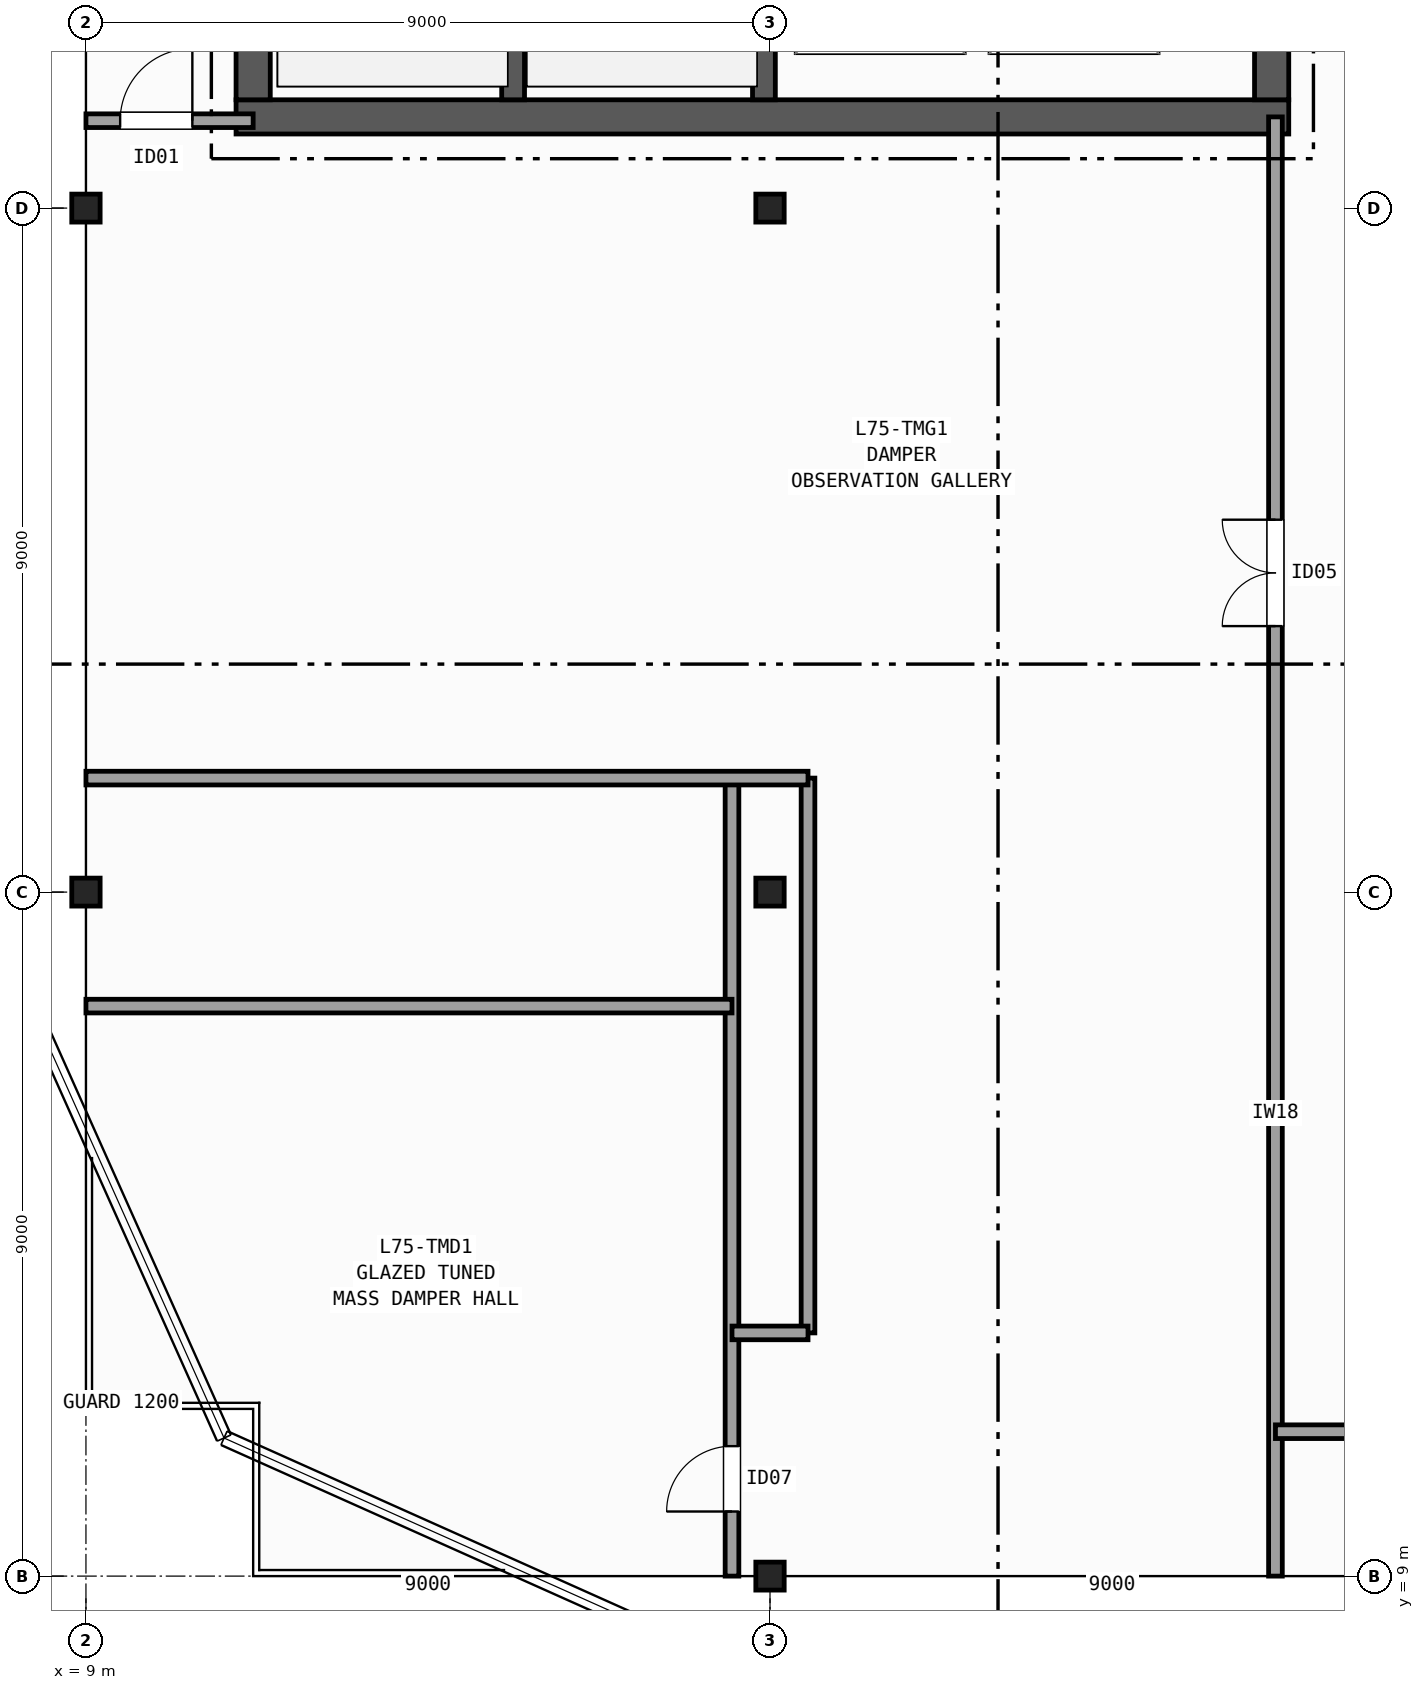
"""IFC4 building model, lengths in metres.
Left out: names, types, materials, properties, quantities, classifications, styles, units other than length and angle.
Written with IfcOpenShell. Run it as: python <this file> out.ifc"""

import sys

from ifc_helpers import new_model, si_unit, direction, frame, frame_2d, origin, origin_2d, place, context, subcontext, project, spatial, rectangle, i_section, extrude, element, fill, save


model = new_model("IFC4")
c1 = context("Model", 3, precision=1e-05, world=origin(), true_north=direction((0.0, 1.0)))
c2 = subcontext(c1, "Body", "Model", "MODEL_VIEW")
j1 = project(units=[si_unit("LENGTHUNIT", "METRE"), si_unit("PLANEANGLEUNIT", "RADIAN")], contexts=[c1])
p1 = place(None, origin())
s1 = spatial("IfcSite", under=j1, at=p1, CompositionType="ELEMENT")
p2 = place(p1, origin())
s2 = spatial("IfcBuilding", under=s1, at=p2, CompositionType="ELEMENT")
p3 = place(p2, frame((0.0, 0.0, 297.4)))
s3 = spatial("IfcBuildingStorey", under=s2, at=p3, CompositionType="ELEMENT", Elevation=297.4)
for number, where, z_axis, x_axis in (
    (1, (9.0, 18.0, 0.0), (0.0, 0.0, 1.0), (1.0, 0.0, 0.0)),
    (2, (9.0, 27.0, 0.0), (0.0, 0.0, 1.0), (1.0, 0.0, 0.0)),
    (3, (18.0, 9.0, 0.0), (0.0, 0.0, 1.0), (1.0, 0.0, 0.0)),
    (4, (18.0, 18.0, 0.0), (0.0, 0.0, 1.0), (1.0, 0.0, 0.0)),
    (5, (18.0, 27.0, 0.0), (0.0, 0.0, 1.0), (1.0, 0.0, 0.0)),
):
    element("IfcColumn", number, at=place(p3, frame(where, z_axis=z_axis, x_axis=x_axis)), inside=s3, PredefinedType="COLUMN", context=c2, shape_type="SweptSolid", body=[
        extrude(i_section(OverallWidth=0.373, OverallDepth=0.368, WebThickness=0.015, FlangeThickness=0.024, FilletRadius=0.015, at=origin_2d()), origin(), (0.0, 0.0, 1.0), 5.2),
    ])
p4 = place(p3, frame((10.975, 28.2, 0.0), z_axis=(0.0, 0.0, 1.0), x_axis=(1.0, 0.0, 0.0)))
e6 = element("IfcWall", 6, at=p4, inside=s3, PredefinedType="SHEAR", context=c2, shape_type="SweptSolid", body=[
    extrude(rectangle(XDim=13.85, YDim=0.45, at=frame_2d((6.925, 0.0))), origin(), (0.0, 0.0, 1.0), 4.87),
])
p5 = place(p3, frame((11.2, 42.175, 0.0), z_axis=(0.0, 0.0, 1.0), x_axis=(0.0, -1.0, 0.0)))
e7 = element("IfcWall", 7, at=p5, inside=s3, PredefinedType="SHEAR", context=c2, shape_type="SweptSolid", body=[
    extrude(rectangle(XDim=13.75, YDim=0.45, at=frame_2d((6.875, 0.0))), origin(), (0.0, 0.0, 1.0), 4.87),
])
p6 = place(p3, frame((24.6, 28.425, 0.0), z_axis=(0.0, 0.0, 1.0), x_axis=(0.0, 1.0, 0.0)))
e8 = element("IfcWall", 8, at=p6, inside=s3, PredefinedType="SHEAR", context=c2, shape_type="SweptSolid", body=[
    extrude(rectangle(XDim=13.75, YDim=0.45, at=frame_2d((6.875, 0.0))), origin(), (0.0, 0.0, 1.0), 4.87),
])
p7 = place(p6, frame((3.375, 0.0, 0.0)))
e9 = element("IfcOpeningElement", 9, at=p7, cuts=e8, PredefinedType="OPENING", context=c2, shape_type="SweptSolid", body=[
    extrude(rectangle(XDim=1.5, YDim=2.2, at=frame_2d((0.75, 1.1))), frame((0.0, 0.235, 0.0), z_axis=(0.0, -1.0, 0.0), x_axis=(1.0, 0.0, 0.0)), (0.0, 0.0, 1.0), 0.47),
])
p8 = place(p6, frame((9.975, 0.0, 0.0)))
e10 = element("IfcOpeningElement", 10, at=p8, cuts=e8, PredefinedType="OPENING", context=c2, shape_type="SweptSolid", body=[
    extrude(rectangle(XDim=0.9, YDim=2.1, at=frame_2d((0.45, 1.05))), frame((0.0, 0.235, 0.0), z_axis=(0.0, -1.0, 0.0), x_axis=(1.0, 0.0, 0.0)), (0.0, 0.0, 1.0), 0.47),
])
p9 = place(p6, frame((12.075, 0.0, 0.0)))
e11 = element("IfcOpeningElement", 11, at=p9, cuts=e8, PredefinedType="OPENING", context=c2, shape_type="SweptSolid", body=[
    extrude(rectangle(XDim=0.9, YDim=2.1, at=frame_2d((0.45, 1.05))), frame((0.0, 0.235, 0.0), z_axis=(0.0, -1.0, 0.0), x_axis=(1.0, 0.0, 0.0)), (0.0, 0.0, 1.0), 0.47),
])
p10 = place(p3, frame((14.62, 28.425, 0.0), z_axis=(0.0, 0.0, 1.0), x_axis=(0.0, 1.0, 0.0)))
e12 = element("IfcWall", 12, at=p10, inside=s3, PredefinedType="SHEAR", context=c2, shape_type="SweptSolid", body=[
    extrude(rectangle(XDim=9.025, YDim=0.3, at=frame_2d((4.512, 0.0))), origin(), (0.0, 0.0, 1.0), 4.87),
])
p11 = place(p3, frame((17.92, 42.175, 0.0), z_axis=(0.0, 0.0, 1.0), x_axis=(0.0, -1.0, 0.0)))
e13 = element("IfcWall", 13, at=p11, inside=s3, PredefinedType="SHEAR", context=c2, shape_type="SweptSolid", body=[
    extrude(rectangle(XDim=13.75, YDim=0.3, at=frame_2d((6.875, 0.0))), origin(), (0.0, 0.0, 1.0), 4.87),
])
p12 = place(p11, frame((2.0, 0.0, 0.0)))
e14 = element("IfcOpeningElement", 14, at=p12, cuts=e13, PredefinedType="OPENING", context=c2, shape_type="SweptSolid", body=[
    extrude(rectangle(XDim=1.15, YDim=2.15, at=frame_2d((0.575, 1.075))), frame((0.0, 0.16, 0.0), z_axis=(0.0, -1.0, 0.0), x_axis=(1.0, 0.0, 0.0)), (0.0, 0.0, 1.0), 0.32),
])
p13 = place(p3, frame((24.65, 9.0, 0.0), z_axis=(0.0, 0.0, 1.0), x_axis=(0.0, 1.0, 0.0)))
e15 = element("IfcWall", 15, at=p13, inside=s3, PredefinedType="PARTITIONING", context=c2, shape_type="SweptSolid", body=[
    extrude(rectangle(XDim=19.2, YDim=0.18, at=frame_2d((9.6, 0.0))), origin(), (0.0, 0.0, 1.0), 4.157),
])
p14 = place(p13, frame((12.5, 0.0, 0.0)))
e16 = element("IfcOpeningElement", 16, at=p14, cuts=e15, PredefinedType="OPENING", context=c2, shape_type="SweptSolid", body=[
    extrude(rectangle(XDim=1.4, YDim=2.15, at=frame_2d((0.7, 1.075))), frame((0.0, 0.1, 0.0), z_axis=(0.0, -1.0, 0.0), x_axis=(1.0, 0.0, 0.0)), (0.0, 0.0, 1.0), 0.2),
])
p15 = place(p3, frame((17.5, 9.0, 0.0), z_axis=(0.0, 0.0, 1.0), x_axis=(0.0, 1.0, 0.0)))
e17 = element("IfcWall", 17, at=p15, inside=s3, PredefinedType="PARTITIONING", context=c2, shape_type="SweptSolid", body=[
    extrude(rectangle(XDim=10.5, YDim=0.18, at=frame_2d((5.25, 0.0))), origin(), (0.0, 0.0, 1.0), 4.239),
])
p16 = place(p15, frame((0.85, 0.0, 0.0)))
e18 = element("IfcOpeningElement", 18, at=p16, cuts=e17, PredefinedType="OPENING", context=c2, shape_type="SweptSolid", body=[
    extrude(rectangle(XDim=0.86, YDim=2.05, at=frame_2d((0.43, 1.025))), frame((0.0, 0.1, 0.0), z_axis=(0.0, -1.0, 0.0), x_axis=(1.0, 0.0, 0.0)), (0.0, 0.0, 1.0), 0.2),
])
p17 = place(p3, frame((18.5, 12.2, 0.0), z_axis=(0.0, 0.0, 1.0), x_axis=(0.0, 1.0, 0.0)))
e19 = element("IfcWall", 19, at=p17, inside=s3, PredefinedType="PARTITIONING", context=c2, shape_type="SweptSolid", body=[
    extrude(rectangle(XDim=7.3, YDim=0.18, at=frame_2d((3.65, 0.0))), origin(), (0.0, 0.0, 1.0), 4.239),
])
p18 = place(p3, frame((17.5, 12.2, 0.0), z_axis=(0.0, 0.0, 1.0), x_axis=(1.0, 0.0, 0.0)))
e20 = element("IfcWall", 20, at=p18, inside=s3, PredefinedType="PARTITIONING", context=c2, shape_type="SweptSolid", body=[
    extrude(rectangle(XDim=1.0, YDim=0.18, at=frame_2d((0.5, 0.0))), origin(), (0.0, 0.0, 1.0), 4.242),
])
p19 = place(p3, frame((9.0, 16.5, 0.0), z_axis=(0.0, 0.0, 1.0), x_axis=(1.0, 0.0, 0.0)))
e21 = element("IfcWall", 21, at=p19, inside=s3, PredefinedType="PARTITIONING", context=c2, shape_type="SweptSolid", body=[
    extrude(rectangle(XDim=8.5, YDim=0.18, at=frame_2d((4.25, 0.0))), origin(), (0.0, 0.0, 1.0), 4.87),
])
p20 = place(p3, frame((9.0, 19.5, 0.0), z_axis=(0.0, 0.0, 1.0), x_axis=(1.0, 0.0, 0.0)))
e22 = element("IfcWall", 22, at=p20, inside=s3, PredefinedType="PARTITIONING", context=c2, shape_type="SweptSolid", body=[
    extrude(rectangle(XDim=9.5, YDim=0.18, at=frame_2d((4.75, 0.0))), origin(), (0.0, 0.0, 1.0), 4.157),
])
p21 = place(p3, frame((9.0, 28.15, 0.0), z_axis=(0.0, 0.0, 1.0), x_axis=(1.0, 0.0, 0.0)))
e23 = element("IfcWall", 23, at=p21, inside=s3, PredefinedType="PARTITIONING", context=c2, shape_type="SweptSolid", body=[
    extrude(rectangle(XDim=2.2, YDim=0.18, at=frame_2d((1.1, 0.0))), origin(), (0.0, 0.0, 1.0), 4.157),
])
p22 = place(p21, frame((0.45, 0.0, 0.0)))
e24 = element("IfcOpeningElement", 24, at=p22, cuts=e23, PredefinedType="OPENING", context=c2, shape_type="SweptSolid", body=[
    extrude(rectangle(XDim=0.95, YDim=2.1, at=frame_2d((0.475, 1.05))), frame((0.0, 0.1, 0.0), z_axis=(0.0, -1.0, 0.0), x_axis=(1.0, 0.0, 0.0)), (0.0, 0.0, 1.0), 0.2),
])
p23 = place(p3, frame((24.65, 10.9, 0.0), z_axis=(0.0, 0.0, 1.0), x_axis=(1.0, 0.0, 0.0)))
e25 = element("IfcWall", 25, at=p23, inside=s3, PredefinedType="PARTITIONING", context=c2, shape_type="SweptSolid", body=[
    extrude(rectangle(XDim=20.35, YDim=0.18, at=frame_2d((10.175, 0.0))), origin(), (0.0, 0.0, 1.0), 4.239),
])
p24 = place(p23, frame((1.8, 0.0, 0.0)))
e26 = element("IfcOpeningElement", 26, at=p24, cuts=e25, PredefinedType="OPENING", context=c2, shape_type="SweptSolid", body=[
    extrude(rectangle(XDim=1.0, YDim=2.1, at=frame_2d((0.5, 1.05))), frame((0.0, 0.1, 0.0), z_axis=(0.0, -1.0, 0.0), x_axis=(1.0, 0.0, 0.0)), (0.0, 0.0, 1.0), 0.2),
])
p25 = place(p14, origin())
e27 = element("IfcDoor", 27, at=p25, inside=s3, OperationType="DOUBLE_DOOR_SINGLE_SWING", PredefinedType="DOOR", context=c2, shape_type="SweptSolid", body=[
    extrude(rectangle(XDim=1.4, YDim=2.15, at=frame_2d((0.7, 1.075))), frame((0.0, 0.025, 0.0), z_axis=(0.0, -1.0, 0.0), x_axis=(1.0, 0.0, 0.0)), (0.0, 0.0, 1.0), 0.05),
])
fill(e16, e27)
p26 = place(p16, origin())
e28 = element("IfcDoor", 28, at=p26, inside=s3, OperationType="SINGLE_SWING_LEFT", PredefinedType="DOOR", context=c2, shape_type="SweptSolid", body=[
    extrude(rectangle(XDim=0.86, YDim=2.05, at=frame_2d((0.43, 1.025))), frame((0.0, 0.025, 0.0), z_axis=(0.0, -1.0, 0.0), x_axis=(1.0, 0.0, 0.0)), (0.0, 0.0, 1.0), 0.05),
])
fill(e18, e28)
p27 = place(p22, origin())
e29 = element("IfcDoor", 29, at=p27, inside=s3, OperationType="SINGLE_SWING_RIGHT", PredefinedType="DOOR", context=c2, shape_type="SweptSolid", body=[
    extrude(rectangle(XDim=0.95, YDim=2.1, at=frame_2d((0.475, 1.05))), frame((0.0, 0.025, 0.0), z_axis=(0.0, -1.0, 0.0), x_axis=(1.0, 0.0, 0.0)), (0.0, 0.0, 1.0), 0.05),
])
fill(e24, e29)
save(model, sys.argv[1])
